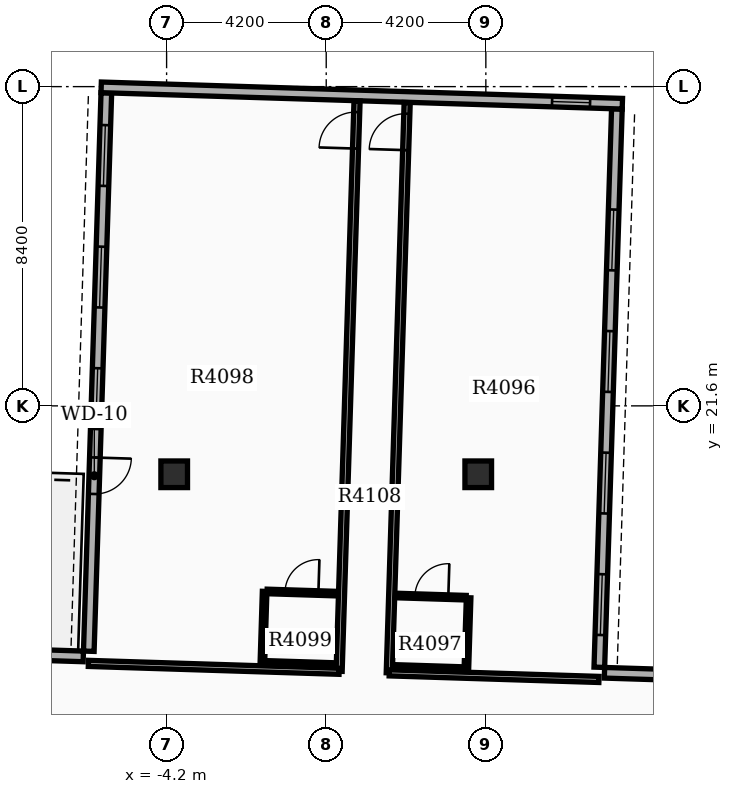
"""IFC4 building model, lengths in metres.
Left out: names, types, materials, properties, quantities, classifications, styles, units other than length and angle.
Written with IfcOpenShell. Run it as: python <this file> out.ifc"""

import sys

from ifc_helpers import new_model, si_unit, direction, frame, frame_2d, origin, origin_2d, place, context, subcontext, project, spatial, rectangle, extrude, element, fill, save


model = new_model("IFC4")
c1 = context("Model", 3, precision=1e-05, world=origin(), true_north=direction((0.0, 1.0)))
c2 = subcontext(c1, "Body", "Model", "MODEL_VIEW")
j1 = project(units=[si_unit("LENGTHUNIT", "METRE"), si_unit("PLANEANGLEUNIT", "RADIAN")], contexts=[c1])
p1 = place(None, origin())
s1 = spatial("IfcSite", under=j1, at=p1, CompositionType="ELEMENT")
p2 = place(p1, origin())
s2 = spatial("IfcBuilding", under=s1, at=p2, CompositionType="ELEMENT")
p3 = place(p2, frame((0.0, 0.0, 257.7)))
s3 = spatial("IfcBuildingStorey", under=s2, at=p3, CompositionType="ELEMENT", Elevation=257.7)
for number, where, z_axis, x_axis in (
    (1, (-4.0, 19.8, 0.0), (0.0, 0.0, 1.0), (1.0, 0.0, 0.0)),
    (2, (4.0, 19.8, 0.0), (0.0, 0.0, 1.0), (1.0, 0.0, 0.0)),
):
    element("IfcColumn", number, at=place(p3, frame(where, z_axis=z_axis, x_axis=x_axis)), inside=s3, PredefinedType="COLUMN", context=c2, shape_type="SweptSolid", body=[
        extrude(rectangle(XDim=0.7, YDim=0.7, at=origin_2d()), origin(), (0.0, 0.0, 1.0), 3.9),
    ])
p4 = place(p3, frame((7.186, 14.721, 0.0), z_axis=(0.0, 0.0, 1.0), x_axis=(0.031405855522, 0.999506714454, 0.0)))
e3 = element("IfcWall", 3, at=p4, inside=s3, PredefinedType="STANDARD", context=c2, shape_type="SweptSolid", body=[
    extrude(rectangle(XDim=14.7, YDim=0.28, at=frame_2d((7.35, 0.0))), origin(), (0.0, 0.0, 1.0), 3.18),
])
p5 = place(p4, frame((0.85, 0.0, 0.8)))
e4 = element("IfcOpeningElement", 4, at=p5, cuts=e3, PredefinedType="OPENING", context=c2, shape_type="SweptSolid", body=[
    extrude(rectangle(XDim=1.6, YDim=1.7, at=frame_2d((0.8, 0.85))), frame((0.0, 0.15, 0.0), z_axis=(0.0, -1.0, 0.0), x_axis=(1.0, 0.0, 0.0)), (0.0, 0.0, 1.0), 0.3),
])
p6 = place(p4, frame((4.05, 0.0, 0.8)))
e5 = element("IfcOpeningElement", 5, at=p6, cuts=e3, PredefinedType="OPENING", context=c2, shape_type="SweptSolid", body=[
    extrude(rectangle(XDim=1.6, YDim=1.7, at=frame_2d((0.8, 0.85))), frame((0.0, 0.15, 0.0), z_axis=(0.0, -1.0, 0.0), x_axis=(1.0, 0.0, 0.0)), (0.0, 0.0, 1.0), 0.3),
])
p7 = place(p4, frame((7.25, 0.0, 0.8)))
e6 = element("IfcOpeningElement", 6, at=p7, cuts=e3, PredefinedType="OPENING", context=c2, shape_type="SweptSolid", body=[
    extrude(rectangle(XDim=1.6, YDim=1.7, at=frame_2d((0.8, 0.85))), frame((0.0, 0.15, 0.0), z_axis=(0.0, -1.0, 0.0), x_axis=(1.0, 0.0, 0.0)), (0.0, 0.0, 1.0), 0.3),
])
p8 = place(p4, frame((10.45, 0.0, 0.8)))
e7 = element("IfcOpeningElement", 7, at=p8, cuts=e3, PredefinedType="OPENING", context=c2, shape_type="SweptSolid", body=[
    extrude(rectangle(XDim=1.6, YDim=1.7, at=frame_2d((0.8, 0.85))), frame((0.0, 0.15, 0.0), z_axis=(0.0, -1.0, 0.0), x_axis=(1.0, 0.0, 0.0)), (0.0, 0.0, 1.0), 0.3),
])
p9 = place(p3, frame((-5.786, 29.836, 0.0), z_axis=(0.0, 0.0, 1.0), x_axis=(-0.031406376864, -0.999506698073, 0.0)))
e8 = element("IfcWall", 8, at=p9, inside=s3, PredefinedType="STANDARD", context=c2, shape_type="SweptSolid", body=[
    extrude(rectangle(XDim=14.7, YDim=0.28, at=frame_2d((7.35, 0.0))), origin(), (0.0, 0.0, 1.0), 3.18),
])
p10 = place(p9, frame((0.85, 0.0, 0.8)))
e9 = element("IfcOpeningElement", 9, at=p10, cuts=e8, PredefinedType="OPENING", context=c2, shape_type="SweptSolid", body=[
    extrude(rectangle(XDim=1.6, YDim=1.7, at=frame_2d((0.8, 0.85))), frame((0.0, 0.15, 0.0), z_axis=(0.0, -1.0, 0.0), x_axis=(1.0, 0.0, 0.0)), (0.0, 0.0, 1.0), 0.3),
])
p11 = place(p9, frame((4.05, 0.0, 0.8)))
e10 = element("IfcOpeningElement", 10, at=p11, cuts=e8, PredefinedType="OPENING", context=c2, shape_type="SweptSolid", body=[
    extrude(rectangle(XDim=1.6, YDim=1.7, at=frame_2d((0.8, 0.85))), frame((0.0, 0.15, 0.0), z_axis=(0.0, -1.0, 0.0), x_axis=(1.0, 0.0, 0.0)), (0.0, 0.0, 1.0), 0.3),
])
p12 = place(p9, frame((7.25, 0.0, 0.8)))
e11 = element("IfcOpeningElement", 11, at=p12, cuts=e8, PredefinedType="OPENING", context=c2, shape_type="SweptSolid", body=[
    extrude(rectangle(XDim=1.6, YDim=1.7, at=frame_2d((0.8, 0.85))), frame((0.0, 0.15, 0.0), z_axis=(0.0, -1.0, 0.0), x_axis=(1.0, 0.0, 0.0)), (0.0, 0.0, 1.0), 0.3),
])
p13 = place(p9, frame((9.6, 0.0, 0.0)))
e12 = element("IfcOpeningElement", 12, at=p13, cuts=e8, PredefinedType="OPENING", context=c2, shape_type="SweptSolid", body=[
    extrude(rectangle(XDim=0.96, YDim=2.1, at=frame_2d((0.48, 1.05))), frame((0.0, 0.15, 0.0), z_axis=(0.0, -1.0, 0.0), x_axis=(1.0, 0.0, 0.0)), (0.0, 0.0, 1.0), 0.3),
])
p14 = place(p3, frame((7.792, 29.55, 0.0), z_axis=(0.0, 0.0, 1.0), x_axis=(-0.999506662003, 0.031407524763, 0.0)))
e13 = element("IfcWall", 13, at=p14, inside=s3, PredefinedType="STANDARD", context=c2, shape_type="SweptSolid", body=[
    extrude(rectangle(XDim=13.72, YDim=0.28, at=frame_2d((6.86, 0.0))), origin(), (0.0, 0.0, 1.0), 3.18),
])
p15 = place(p14, frame((0.85, 0.0, 0.85)))
e14 = element("IfcOpeningElement", 14, at=p15, cuts=e13, PredefinedType="OPENING", context=c2, shape_type="SweptSolid", body=[
    extrude(rectangle(XDim=1.0, YDim=1.5, at=frame_2d((0.5, 0.75))), frame((0.0, 0.15, 0.0), z_axis=(0.0, -1.0, 0.0), x_axis=(1.0, 0.0, 0.0)), (0.0, 0.0, 1.0), 0.3),
])
p16 = place(p3, frame((13.618, 14.379, 0.0), z_axis=(0.0, 0.0, 1.0), x_axis=(-0.999507224741, 0.031389611199, 0.0)))
e15 = element("IfcWall", 15, at=p16, inside=s3, PredefinedType="STANDARD", context=c2, shape_type="SweptSolid", body=[
    extrude(rectangle(XDim=6.3, YDim=0.28, at=frame_2d((3.15, 0.0))), origin(), (0.0, 0.0, 1.0), 3.18),
])
p17 = place(p3, frame((-12.689, 15.206, 0.0), z_axis=(0.0, 0.0, 1.0), x_axis=(0.999507262922, -0.031388395416, 0.0)))
e16 = element("IfcWall", 16, at=p17, inside=s3, PredefinedType="STANDARD", context=c2, shape_type="SweptSolid", body=[
    extrude(rectangle(XDim=6.3, YDim=0.28, at=frame_2d((3.15, 0.0))), origin(), (0.0, 0.0, 1.0), 3.18),
])
p18 = place(p3, frame((1.659, 14.575, 0.0), z_axis=(0.0, 0.0, 1.0), x_axis=(0.031404333983, 0.999506762262, 0.0)))
e17 = element("IfcWall", 17, at=p18, inside=s3, PredefinedType="PARTITIONING", context=c2, shape_type="SweptSolid", body=[
    extrude(rectangle(XDim=15.012, YDim=0.16, at=frame_2d((7.506, 0.0))), origin(), (0.0, 0.0, 1.0), 3.17),
])
p19 = place(p18, frame((13.76, 0.0, 0.0)))
e18 = element("IfcOpeningElement", 18, at=p19, cuts=e17, PredefinedType="OPENING", context=c2, shape_type="SweptSolid", body=[
    extrude(rectangle(XDim=0.96, YDim=2.15, at=frame_2d((0.48, 1.075))), frame((0.0, 0.09, 0.0), z_axis=(0.0, -1.0, 0.0), x_axis=(1.0, 0.0, 0.0)), (0.0, 0.0, 1.0), 0.18),
])
p20 = place(p3, frame((1.659, 14.575, 0.0), z_axis=(0.0, 0.0, 1.0), x_axis=(0.999505408206, -0.031447400002, 0.0)))
e19 = element("IfcWall", 19, at=p20, inside=s3, PredefinedType="PARTITIONING", context=c2, shape_type="SweptSolid", body=[
    extrude(rectangle(XDim=5.52, YDim=0.16, at=frame_2d((2.76, 0.0))), origin(), (0.0, 0.0, 1.0), 3.17),
])
p21 = place(p3, frame((1.863, 16.61, 0.0), z_axis=(0.0, 0.0, 1.0), x_axis=(0.999507221803, -0.031389704724, 0.0)))
e20 = element("IfcWall", 20, at=p21, inside=s3, PredefinedType="PARTITIONING", context=c2, shape_type="SweptSolid", body=[
    extrude(rectangle(XDim=1.82, YDim=0.12, at=frame_2d((0.91, 0.0))), origin(), (0.0, 0.0, 1.0), 3.17),
])
p22 = place(p21, frame((0.47, 0.0, 0.0)))
e21 = element("IfcOpeningElement", 21, at=p22, cuts=e20, PredefinedType="OPENING", context=c2, shape_type="SweptSolid", body=[
    extrude(rectangle(XDim=0.88, YDim=2.1, at=frame_2d((0.44, 1.05))), frame((0.0, 0.07, 0.0), z_axis=(0.0, -1.0, 0.0), x_axis=(1.0, 0.0, 0.0)), (0.0, 0.0, 1.0), 0.14),
])
p23 = place(p3, frame((1.804, 14.731, 0.0), z_axis=(0.0, 0.0, 1.0), x_axis=(0.999503004171, -0.03152371574, 0.0)))
e22 = element("IfcWall", 22, at=p23, inside=s3, PredefinedType="PARTITIONING", context=c2, shape_type="SweptSolid", body=[
    extrude(rectangle(XDim=1.82, YDim=0.12, at=frame_2d((0.91, 0.0))), origin(), (0.0, 0.0, 1.0), 3.17),
])
p24 = place(p3, frame((3.688, 14.671, 0.0), z_axis=(0.0, 0.0, 1.0), x_axis=(0.031295563454, 0.999510173889, 0.0)))
e23 = element("IfcWall", 23, at=p24, inside=s3, PredefinedType="PARTITIONING", context=c2, shape_type="SweptSolid", body=[
    extrude(rectangle(XDim=1.88, YDim=0.12, at=frame_2d((0.94, 0.0))), origin(), (0.0, 0.0, 1.0), 3.17),
])
p25 = place(p3, frame((0.339, 14.617, 0.0), z_axis=(0.0, 0.0, 1.0), x_axis=(0.031404333983, 0.999506762262, 0.0)))
e24 = element("IfcWall", 24, at=p25, inside=s3, PredefinedType="PARTITIONING", context=c2, shape_type="SweptSolid", body=[
    extrude(rectangle(XDim=15.012, YDim=0.16, at=frame_2d((7.506, 0.0))), origin(), (0.0, 0.0, 1.0), 3.17),
])
p26 = place(p25, frame((13.76, 0.0, 0.0)))
e25 = element("IfcOpeningElement", 25, at=p26, cuts=e24, PredefinedType="OPENING", context=c2, shape_type="SweptSolid", body=[
    extrude(rectangle(XDim=0.96, YDim=2.15, at=frame_2d((0.48, 1.075))), frame((0.0, 0.09, 0.0), z_axis=(0.0, -1.0, 0.0), x_axis=(1.0, 0.0, 0.0)), (0.0, 0.0, 1.0), 0.18),
])
p27 = place(p3, frame((0.339, 14.617, 0.0), z_axis=(0.0, 0.0, 1.0), x_axis=(-0.999506756764, 0.031404508956, 0.0)))
e26 = element("IfcWall", 26, at=p27, inside=s3, PredefinedType="PARTITIONING", context=c2, shape_type="SweptSolid", body=[
    extrude(rectangle(XDim=6.6, YDim=0.16, at=frame_2d((3.3, 0.0))), origin(), (0.0, 0.0, 1.0), 3.17),
])
p28 = place(p3, frame((-1.556, 16.717, 0.0), z_axis=(0.0, 0.0, 1.0), x_axis=(0.999507221803, -0.031389704724, 0.0)))
e27 = element("IfcWall", 27, at=p28, inside=s3, PredefinedType="PARTITIONING", context=c2, shape_type="SweptSolid", body=[
    extrude(rectangle(XDim=1.82, YDim=0.12, at=frame_2d((0.91, 0.0))), origin(), (0.0, 0.0, 1.0), 3.17),
])
p29 = place(p28, frame((0.47, 0.0, 0.0)))
e28 = element("IfcOpeningElement", 28, at=p29, cuts=e27, PredefinedType="OPENING", context=c2, shape_type="SweptSolid", body=[
    extrude(rectangle(XDim=0.88, YDim=2.1, at=frame_2d((0.44, 1.05))), frame((0.0, 0.07, 0.0), z_axis=(0.0, -1.0, 0.0), x_axis=(1.0, 0.0, 0.0)), (0.0, 0.0, 1.0), 0.14),
])
p30 = place(p3, frame((-1.615, 14.838, 0.0), z_axis=(0.0, 0.0, 1.0), x_axis=(0.999511421504, -0.031255692016, 0.0)))
e29 = element("IfcWall", 29, at=p30, inside=s3, PredefinedType="PARTITIONING", context=c2, shape_type="SweptSolid", body=[
    extrude(rectangle(XDim=1.82, YDim=0.12, at=frame_2d((0.91, 0.0))), origin(), (0.0, 0.0, 1.0), 3.17),
])
p31 = place(p3, frame((-1.68, 14.84, 0.0), z_axis=(0.0, 0.0, 1.0), x_axis=(0.031425292588, 0.999506103526, 0.0)))
e30 = element("IfcWall", 30, at=p31, inside=s3, PredefinedType="PARTITIONING", context=c2, shape_type="SweptSolid", body=[
    extrude(rectangle(XDim=1.88, YDim=0.12, at=frame_2d((0.94, 0.0))), origin(), (0.0, 0.0, 1.0), 3.17),
])
p32 = place(p5, origin())
e31 = element("IfcWindow", 31, at=p32, inside=s3, PartitioningType="SINGLE_PANEL", PredefinedType="WINDOW", context=c2, shape_type="SweptSolid", body=[
    extrude(rectangle(XDim=1.6, YDim=1.7, at=frame_2d((0.8, 0.85))), frame((0.0, 0.03, 0.0), z_axis=(0.0, -1.0, 0.0), x_axis=(1.0, 0.0, 0.0)), (0.0, 0.0, 1.0), 0.06),
])
fill(e4, e31)
p33 = place(p6, origin())
e32 = element("IfcWindow", 32, at=p33, inside=s3, PartitioningType="SINGLE_PANEL", PredefinedType="WINDOW", context=c2, shape_type="SweptSolid", body=[
    extrude(rectangle(XDim=1.6, YDim=1.7, at=frame_2d((0.8, 0.85))), frame((0.0, 0.03, 0.0), z_axis=(0.0, -1.0, 0.0), x_axis=(1.0, 0.0, 0.0)), (0.0, 0.0, 1.0), 0.06),
])
fill(e5, e32)
p34 = place(p7, origin())
e33 = element("IfcWindow", 33, at=p34, inside=s3, PartitioningType="SINGLE_PANEL", PredefinedType="WINDOW", context=c2, shape_type="SweptSolid", body=[
    extrude(rectangle(XDim=1.6, YDim=1.7, at=frame_2d((0.8, 0.85))), frame((0.0, 0.03, 0.0), z_axis=(0.0, -1.0, 0.0), x_axis=(1.0, 0.0, 0.0)), (0.0, 0.0, 1.0), 0.06),
])
fill(e6, e33)
p35 = place(p8, origin())
e34 = element("IfcWindow", 34, at=p35, inside=s3, PartitioningType="SINGLE_PANEL", PredefinedType="WINDOW", context=c2, shape_type="SweptSolid", body=[
    extrude(rectangle(XDim=1.6, YDim=1.7, at=frame_2d((0.8, 0.85))), frame((0.0, 0.03, 0.0), z_axis=(0.0, -1.0, 0.0), x_axis=(1.0, 0.0, 0.0)), (0.0, 0.0, 1.0), 0.06),
])
fill(e7, e34)
p36 = place(p10, origin())
e35 = element("IfcWindow", 35, at=p36, inside=s3, PartitioningType="SINGLE_PANEL", PredefinedType="WINDOW", context=c2, shape_type="SweptSolid", body=[
    extrude(rectangle(XDim=1.6, YDim=1.7, at=frame_2d((0.8, 0.85))), frame((0.0, 0.03, 0.0), z_axis=(0.0, -1.0, 0.0), x_axis=(1.0, 0.0, 0.0)), (0.0, 0.0, 1.0), 0.06),
])
fill(e9, e35)
p37 = place(p11, origin())
e36 = element("IfcWindow", 36, at=p37, inside=s3, PartitioningType="SINGLE_PANEL", PredefinedType="WINDOW", context=c2, shape_type="SweptSolid", body=[
    extrude(rectangle(XDim=1.6, YDim=1.7, at=frame_2d((0.8, 0.85))), frame((0.0, 0.03, 0.0), z_axis=(0.0, -1.0, 0.0), x_axis=(1.0, 0.0, 0.0)), (0.0, 0.0, 1.0), 0.06),
])
fill(e10, e36)
p38 = place(p12, origin())
e37 = element("IfcWindow", 37, at=p38, inside=s3, PartitioningType="SINGLE_PANEL", PredefinedType="WINDOW", context=c2, shape_type="SweptSolid", body=[
    extrude(rectangle(XDim=1.6, YDim=1.7, at=frame_2d((0.8, 0.85))), frame((0.0, 0.03, 0.0), z_axis=(0.0, -1.0, 0.0), x_axis=(1.0, 0.0, 0.0)), (0.0, 0.0, 1.0), 0.06),
])
fill(e11, e37)
p39 = place(p15, origin())
e38 = element("IfcWindow", 38, at=p39, inside=s3, PartitioningType="SINGLE_PANEL", PredefinedType="WINDOW", context=c2, shape_type="SweptSolid", body=[
    extrude(rectangle(XDim=1.0, YDim=1.5, at=frame_2d((0.5, 0.75))), frame((0.0, 0.03, 0.0), z_axis=(0.0, -1.0, 0.0), x_axis=(1.0, 0.0, 0.0)), (0.0, 0.0, 1.0), 0.06),
])
fill(e14, e38)
p40 = place(p13, origin())
e39 = element("IfcDoor", 39, at=p40, inside=s3, OperationType="SINGLE_SWING_LEFT", PredefinedType="DOOR", context=c2, shape_type="SweptSolid", body=[
    extrude(rectangle(XDim=0.96, YDim=2.1, at=frame_2d((0.48, 1.05))), frame((0.0, 0.025, 0.0), z_axis=(0.0, -1.0, 0.0), x_axis=(1.0, 0.0, 0.0)), (0.0, 0.0, 1.0), 0.05),
])
fill(e12, e39)
p41 = place(p19, origin())
e40 = element("IfcDoor", 40, at=p41, inside=s3, OperationType="SINGLE_SWING_LEFT", PredefinedType="DOOR", context=c2, shape_type="SweptSolid", body=[
    extrude(rectangle(XDim=0.96, YDim=2.15, at=frame_2d((0.48, 1.075))), frame((0.0, 0.025, 0.0), z_axis=(0.0, -1.0, 0.0), x_axis=(1.0, 0.0, 0.0)), (0.0, 0.0, 1.0), 0.05),
])
fill(e18, e40)
p42 = place(p22, origin())
e41 = element("IfcDoor", 41, at=p42, inside=s3, OperationType="SINGLE_SWING_RIGHT", PredefinedType="DOOR", context=c2, shape_type="SweptSolid", body=[
    extrude(rectangle(XDim=0.88, YDim=2.1, at=frame_2d((0.44, 1.05))), frame((0.0, 0.025, 0.0), z_axis=(0.0, -1.0, 0.0), x_axis=(1.0, 0.0, 0.0)), (0.0, 0.0, 1.0), 0.05),
])
fill(e21, e41)
p43 = place(p26, origin())
e42 = element("IfcDoor", 42, at=p43, inside=s3, OperationType="SINGLE_SWING_LEFT", PredefinedType="DOOR", context=c2, shape_type="SweptSolid", body=[
    extrude(rectangle(XDim=0.96, YDim=2.15, at=frame_2d((0.48, 1.075))), frame((0.0, 0.025, 0.0), z_axis=(0.0, -1.0, 0.0), x_axis=(1.0, 0.0, 0.0)), (0.0, 0.0, 1.0), 0.05),
])
fill(e25, e42)
p44 = place(p29, origin())
e43 = element("IfcDoor", 43, at=p44, inside=s3, OperationType="SINGLE_SWING_RIGHT", PredefinedType="DOOR", context=c2, shape_type="SweptSolid", body=[
    extrude(rectangle(XDim=0.88, YDim=2.1, at=frame_2d((0.44, 1.05))), frame((0.0, 0.025, 0.0), z_axis=(0.0, -1.0, 0.0), x_axis=(1.0, 0.0, 0.0)), (0.0, 0.0, 1.0), 0.05),
])
fill(e28, e43)
save(model, sys.argv[1])
